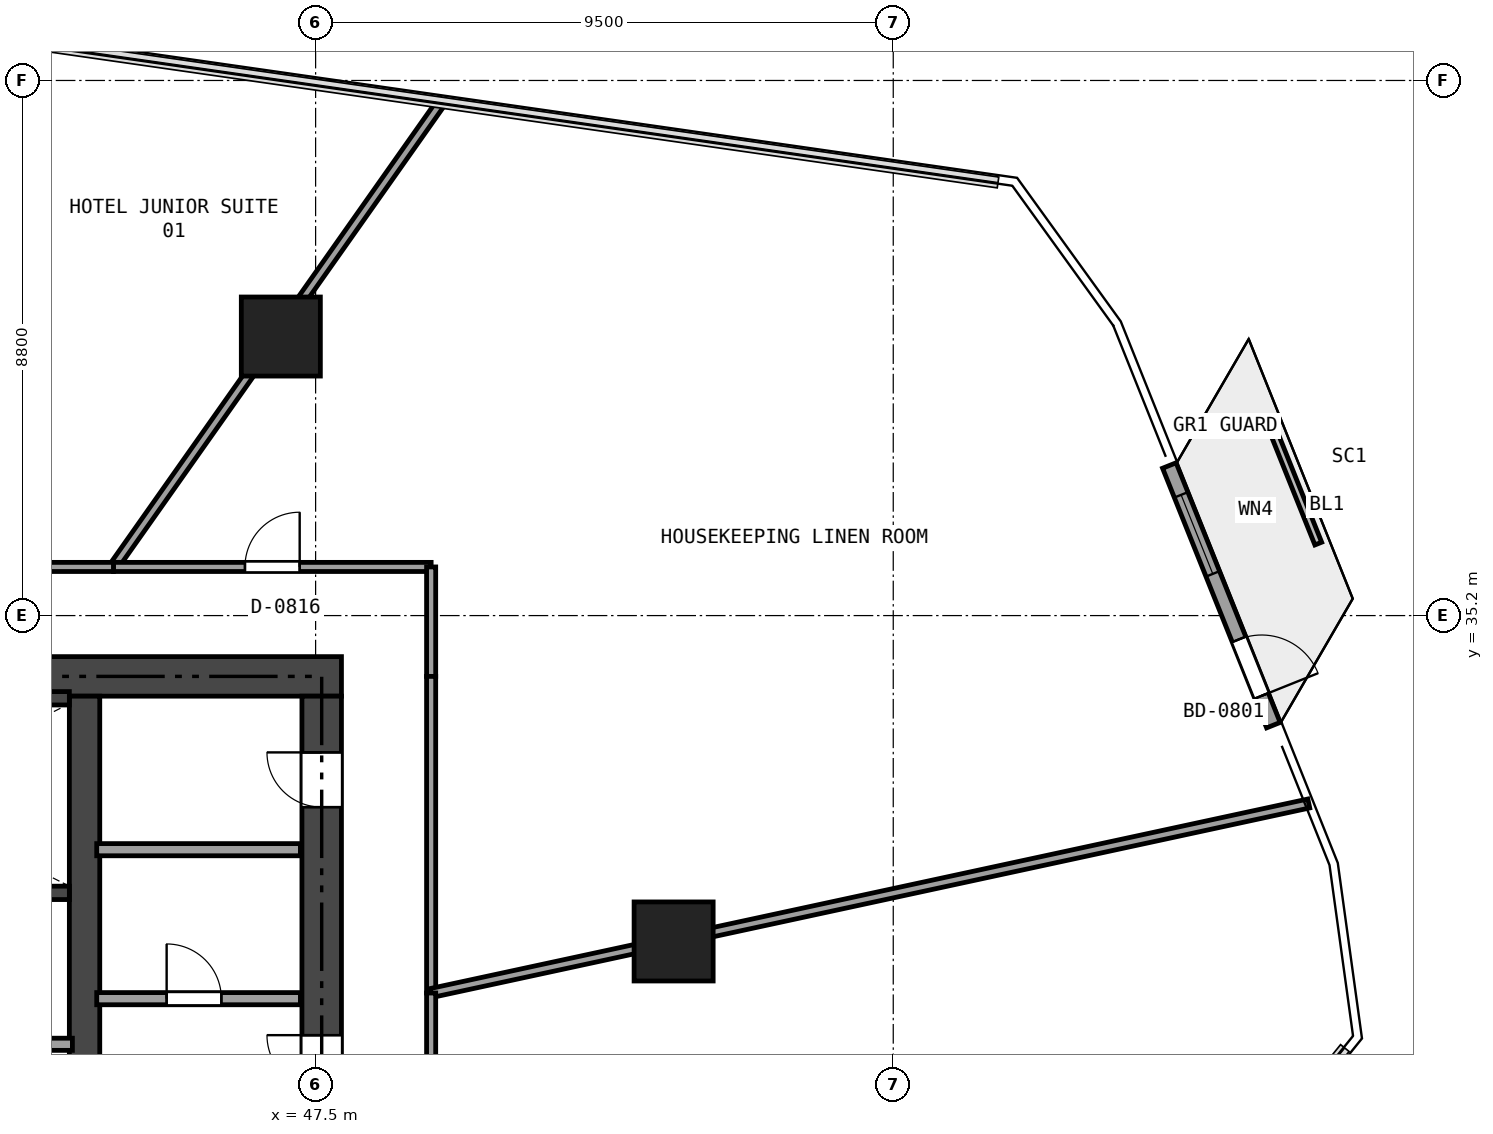
"""IFC4 building model, lengths in metres.
Left out: names, types, materials, properties, quantities, classifications, styles, units other than length and angle.
Written with IfcOpenShell. Run it as: python <this file> out.ifc"""

import sys

from ifc_helpers import new_model, si_unit, direction, frame, frame_2d, origin, origin_2d, place, context, subcontext, project, spatial, rectangle, extrude, element, fill, save


model = new_model("IFC4")
c1 = context("Model", 3, precision=1e-05, world=origin(), true_north=direction((0.0, 1.0)))
c2 = subcontext(c1, "Body", "Model", "MODEL_VIEW")
j1 = project(units=[si_unit("LENGTHUNIT", "METRE"), si_unit("PLANEANGLEUNIT", "RADIAN")], contexts=[c1])
p1 = place(None, origin())
s1 = spatial("IfcSite", under=j1, at=p1, CompositionType="ELEMENT")
p2 = place(p1, origin())
s2 = spatial("IfcBuilding", under=s1, at=p2, CompositionType="ELEMENT")
p3 = place(p2, frame((0.0, 0.0, 37.35)))
s3 = spatial("IfcBuildingStorey", under=s2, at=p3, CompositionType="ELEMENT", Elevation=37.35)
p4 = place(p3, frame((26.475, 34.2, 0.0), z_axis=(0.0, 0.0, 1.0), x_axis=(1.0, 0.0, 0.0)))
e1 = element("IfcWall", 1, at=p4, inside=s3, PredefinedType="SHEAR", context=c2, shape_type="SweptSolid", body=[
    extrude(rectangle(XDim=21.45, YDim=0.65, at=frame_2d((10.725, 0.0))), origin(), (0.0, 0.0, 1.0), 3.17),
])
p5 = place(p4, frame((9.725, 0.0, 0.0)))
e2 = element("IfcOpeningElement", 2, at=p5, cuts=e1, PredefinedType="OPENING", context=c2, shape_type="SweptSolid", body=[
    extrude(rectangle(XDim=1.1, YDim=2.15, at=frame_2d((0.55, 1.075))), frame((0.0, 0.335, 0.0), z_axis=(0.0, -1.0, 0.0), x_axis=(1.0, 0.0, 0.0)), (0.0, 0.0, 1.0), 0.67),
])
p6 = place(p4, frame((1.975, 0.0, 0.0)))
e3 = element("IfcOpeningElement", 3, at=p6, cuts=e1, PredefinedType="OPENING", context=c2, shape_type="SweptSolid", body=[
    extrude(rectangle(XDim=0.9, YDim=2.1, at=frame_2d((0.45, 1.05))), frame((0.0, 0.335, 0.0), z_axis=(0.0, -1.0, 0.0), x_axis=(1.0, 0.0, 0.0)), (0.0, 0.0, 1.0), 0.67),
])
p7 = place(p4, frame((6.275, 0.0, 0.0)))
e4 = element("IfcOpeningElement", 4, at=p7, cuts=e1, PredefinedType="OPENING", context=c2, shape_type="SweptSolid", body=[
    extrude(rectangle(XDim=0.9, YDim=2.1, at=frame_2d((0.45, 1.05))), frame((0.0, 0.335, 0.0), z_axis=(0.0, -1.0, 0.0), x_axis=(1.0, 0.0, 0.0)), (0.0, 0.0, 1.0), 0.67),
])
p8 = place(p3, frame((47.6, 18.925, 0.0), z_axis=(0.0, 0.0, 1.0), x_axis=(0.0, 1.0, 0.0)))
e5 = element("IfcWall", 5, at=p8, inside=s3, PredefinedType="SHEAR", context=c2, shape_type="SweptSolid", body=[
    extrude(rectangle(XDim=14.95, YDim=0.65, at=frame_2d((7.475, 0.0))), origin(), (0.0, 0.0, 1.0), 3.17),
])
p9 = place(p8, frame((6.575, 0.0, 0.0)))
e6 = element("IfcOpeningElement", 6, at=p9, cuts=e5, PredefinedType="OPENING", context=c2, shape_type="SweptSolid", body=[
    extrude(rectangle(XDim=1.1, YDim=2.15, at=frame_2d((0.55, 1.075))), frame((0.0, 0.335, 0.0), z_axis=(0.0, -1.0, 0.0), x_axis=(1.0, 0.0, 0.0)), (0.0, 0.0, 1.0), 0.67),
])
p10 = place(p8, frame((8.475, 0.0, 0.0)))
e7 = element("IfcOpeningElement", 7, at=p10, cuts=e5, PredefinedType="OPENING", context=c2, shape_type="SweptSolid", body=[
    extrude(rectangle(XDim=0.9, YDim=2.1, at=frame_2d((0.45, 1.05))), frame((0.0, 0.335, 0.0), z_axis=(0.0, -1.0, 0.0), x_axis=(1.0, 0.0, 0.0)), (0.0, 0.0, 1.0), 0.67),
])
p11 = place(p8, frame((13.125, 0.0, 0.0)))
e8 = element("IfcOpeningElement", 8, at=p11, cuts=e5, PredefinedType="OPENING", context=c2, shape_type="SweptSolid", body=[
    extrude(rectangle(XDim=0.9, YDim=2.1, at=frame_2d((0.45, 1.05))), frame((0.0, 0.335, 0.0), z_axis=(0.0, -1.0, 0.0), x_axis=(1.0, 0.0, 0.0)), (0.0, 0.0, 1.0), 0.67),
])
p12 = place(p3, frame((43.7, 18.925, 0.0), z_axis=(0.0, 0.0, 1.0), x_axis=(0.0, 1.0, 0.0)))
e9 = element("IfcWall", 9, at=p12, inside=s3, PredefinedType="SHEAR", context=c2, shape_type="SweptSolid", body=[
    extrude(rectangle(XDim=14.95, YDim=0.5, at=frame_2d((7.475, 0.0))), origin(), (0.0, 0.0, 1.0), 3.17),
])
p13 = place(p12, frame((8.075, 0.0, 0.0)))
e10 = element("IfcOpeningElement", 10, at=p13, cuts=e9, PredefinedType="OPENING", context=c2, shape_type="SweptSolid", body=[
    extrude(rectangle(XDim=0.9, YDim=2.1, at=frame_2d((0.45, 1.05))), frame((0.0, 0.26, 0.0), z_axis=(0.0, -1.0, 0.0), x_axis=(1.0, 0.0, 0.0)), (0.0, 0.0, 1.0), 0.52),
])
p14 = place(p3, frame((35.84, 30.64, 0.0), z_axis=(0.0, 0.0, 1.0), x_axis=(1.0, 0.0, 0.0)))
e11 = element("IfcWall", 11, at=p14, inside=s3, PredefinedType="SHEAR", context=c2, shape_type="SweptSolid", body=[
    extrude(rectangle(XDim=7.61, YDim=0.22, at=frame_2d((3.805, 0.0))), origin(), (0.0, 0.0, 1.0), 3.17),
])
p15 = place(p3, frame((37.55, 33.84, 0.0), z_axis=(0.0, 0.0, 1.0), x_axis=(1.0, 0.0, 0.0)))
e12 = element("IfcWall", 12, at=p15, inside=s3, PredefinedType="SHEAR", context=c2, shape_type="SweptSolid", body=[
    extrude(rectangle(XDim=5.9, YDim=0.22, at=frame_2d((2.95, 0.0))), origin(), (0.0, 0.0, 1.0), 3.17),
])
for number, where, z_axis, x_axis in (
    (13, (53.388, 29.841, 0.0), (0.0, 0.0, 1.0), (1.0, 0.0, 0.0)),
    (14, (46.928, 39.789, 0.0), (0.0, 0.0, 1.0), (1.0, 0.0, 0.0)),
):
    element("IfcColumn", number, at=place(p3, frame(where, z_axis=z_axis, x_axis=x_axis)), inside=s3, PredefinedType="COLUMN", context=c2, shape_type="SweptSolid", body=[
        extrude(rectangle(XDim=1.3, YDim=1.3, at=origin_2d()), origin(), (0.0, 0.0, 1.0), 3.17),
    ])
p16 = place(p3, frame((61.541, 37.668, 0.0), z_axis=(0.0, 0.0, 1.0), x_axis=(0.371939648456, -0.92825691374, 0.0)))
e15 = element("IfcWall", 15, at=p16, inside=s3, PredefinedType="SOLIDWALL", context=c2, shape_type="SweptSolid", body=[
    extrude(rectangle(XDim=4.6, YDim=0.24, at=frame_2d((2.3, 0.0))), origin(), (0.0, 0.0, 1.0), 3.17),
])
p17 = place(p16, frame((3.08, 0.0, 0.0)))
e16 = element("IfcOpeningElement", 16, at=p17, cuts=e15, PredefinedType="OPENING", context=c2, shape_type="SweptSolid", body=[
    extrude(rectangle(XDim=1.0, YDim=2.15, at=frame_2d((0.5, 1.075))), frame((0.0, 0.13, 0.0), z_axis=(0.0, -1.0, 0.0), x_axis=(1.0, 0.0, 0.0)), (0.0, 0.0, 1.0), 0.26),
])
p18 = place(p16, frame((0.52, 0.0, 0.2)))
e17 = element("IfcOpeningElement", 17, at=p18, cuts=e15, PredefinedType="OPENING", context=c2, shape_type="SweptSolid", body=[
    extrude(rectangle(XDim=1.4, YDim=1.95, at=frame_2d((0.7, 0.975))), frame((0.0, 0.13, 0.0), z_axis=(0.0, -1.0, 0.0), x_axis=(1.0, 0.0, 0.0)), (0.0, 0.0, 1.0), 0.26),
])
p19 = place(p3, frame((43.9, 28.9, 0.0), z_axis=(0.0, 0.0, 1.0), x_axis=(1.0, 0.0, 0.0)))
e18 = element("IfcWall", 18, at=p19, inside=s3, PredefinedType="SOLIDWALL", context=c2, shape_type="SweptSolid", body=[
    extrude(rectangle(XDim=3.35, YDim=0.2, at=frame_2d((1.675, 0.0))), origin(), (0.0, 0.0, 1.0), 3.17),
])
p20 = place(p19, frame((1.15, 0.0, 0.0)))
e19 = element("IfcOpeningElement", 19, at=p20, cuts=e18, PredefinedType="OPENING", context=c2, shape_type="SweptSolid", body=[
    extrude(rectangle(XDim=0.9, YDim=2.1, at=frame_2d((0.45, 1.05))), frame((0.0, 0.11, 0.0), z_axis=(0.0, -1.0, 0.0), x_axis=(1.0, 0.0, 0.0)), (0.0, 0.0, 1.0), 0.22),
])
p21 = place(p3, frame((43.9, 31.35, 0.0), z_axis=(0.0, 0.0, 1.0), x_axis=(1.0, 0.0, 0.0)))
e20 = element("IfcWall", 20, at=p21, inside=s3, PredefinedType="SOLIDWALL", context=c2, shape_type="SweptSolid", body=[
    extrude(rectangle(XDim=3.35, YDim=0.2, at=frame_2d((1.675, 0.0))), origin(), (0.0, 0.0, 1.0), 3.17),
])
p22 = place(p3, frame((35.62, 28.15, 0.0), z_axis=(0.0, 0.0, 1.0), x_axis=(1.0, 0.0, 0.0)))
e21 = element("IfcWall", 21, at=p22, inside=s3, PredefinedType="SOLIDWALL", context=c2, shape_type="SweptSolid", body=[
    extrude(rectangle(XDim=7.88, YDim=0.2, at=frame_2d((3.94, 0.0))), origin(), (0.0, 0.0, 1.0), 3.17),
])
p23 = place(p3, frame((49.594, 43.681, 0.0), z_axis=(0.0, 0.0, 1.0), x_axis=(-0.576479240775, -0.817111794649, 0.0)))
e22 = element("IfcWall", 22, at=p23, inside=s3, PredefinedType="PARTITIONING", context=c2, shape_type="SweptSolid", body=[
    extrude(rectangle(XDim=9.4, YDim=0.15, at=frame_2d((4.7, 0.0))), origin(), (0.0, 0.0, 1.0), 2.395),
])
p24 = place(p3, frame((44.175, 36.0, 0.0), z_axis=(0.0, 0.0, 1.0), x_axis=(1.0, 0.0, 0.0)))
e23 = element("IfcWall", 23, at=p24, inside=s3, PredefinedType="PARTITIONING", context=c2, shape_type="SweptSolid", body=[
    extrude(rectangle(XDim=5.225, YDim=0.15, at=frame_2d((2.612, 0.0))), origin(), (0.0, 0.0, 1.0), 2.355),
])
p25 = place(p24, frame((2.163, 0.0, 0.0)))
e24 = element("IfcOpeningElement", 24, at=p25, cuts=e23, PredefinedType="OPENING", context=c2, shape_type="SweptSolid", body=[
    extrude(rectangle(XDim=0.9, YDim=2.0, at=frame_2d((0.45, 1.0))), frame((0.0, 0.085, 0.0), z_axis=(0.0, -1.0, 0.0), x_axis=(1.0, 0.0, 0.0)), (0.0, 0.0, 1.0), 0.17),
])
p26 = place(p3, frame((49.4, 36.0, 0.0), z_axis=(0.0, 0.0, 1.0), x_axis=(0.0, -1.0, 0.0)))
e25 = element("IfcWall", 25, at=p26, inside=s3, PredefinedType="PARTITIONING", context=c2, shape_type="SweptSolid", body=[
    extrude(rectangle(XDim=1.8, YDim=0.15, at=frame_2d((0.9, 0.0))), origin(), (0.0, 0.0, 1.0), 2.355),
])
p27 = place(p3, frame((49.4, 34.2, 0.0), z_axis=(0.0, 0.0, 1.0), x_axis=(0.0, -1.0, 0.0)))
e26 = element("IfcWall", 26, at=p27, inside=s3, PredefinedType="PARTITIONING", context=c2, shape_type="SweptSolid", body=[
    extrude(rectangle(XDim=5.207, YDim=0.15, at=frame_2d((2.604, 0.0))), origin(), (0.0, 0.0, 1.0), 2.395),
])
p28 = place(p3, frame((49.4, 28.993, 0.0), z_axis=(0.0, 0.0, 1.0), x_axis=(0.977465823559, 0.211093732201, 0.0)))
e27 = element("IfcWall", 27, at=p28, inside=s3, PredefinedType="PARTITIONING", context=c2, shape_type="SweptSolid", body=[
    extrude(rectangle(XDim=14.767, YDim=0.15, at=frame_2d((7.383, 0.0))), origin(), (0.0, 0.0, 1.0), 2.395),
])
p29 = place(p3, frame((36.865, 36.0, 0.0), z_axis=(0.0, 0.0, 1.0), x_axis=(1.0, 0.0, 0.0)))
e28 = element("IfcWall", 28, at=p29, inside=s3, PredefinedType="PARTITIONING", context=c2, shape_type="SweptSolid", body=[
    extrude(rectangle(XDim=7.31, YDim=0.15, at=frame_2d((3.655, 0.0))), origin(), (0.0, 0.0, 1.0), 2.395),
])
p30 = place(p29, frame((3.18, 0.0, 0.0)))
e29 = element("IfcOpeningElement", 29, at=p30, cuts=e28, PredefinedType="OPENING", context=c2, shape_type="SweptSolid", body=[
    extrude(rectangle(XDim=0.95, YDim=2.15, at=frame_2d((0.475, 1.075))), frame((0.0, 0.085, 0.0), z_axis=(0.0, -1.0, 0.0), x_axis=(1.0, 0.0, 0.0)), (0.0, 0.0, 1.0), 0.17),
])
p31 = place(p3, frame((49.4, 28.993, 0.0), z_axis=(0.0, 0.0, 1.0), x_axis=(0.0, -1.0, 0.0)))
e30 = element("IfcWall", 30, at=p31, inside=s3, PredefinedType="PARTITIONING", context=c2, shape_type="SweptSolid", body=[
    extrude(rectangle(XDim=7.033, YDim=0.15, at=frame_2d((3.517, 0.0))), origin(), (0.0, 0.0, 1.0), 2.395),
])
p32 = place(p31, frame((3.041, 0.0, 0.0)))
e31 = element("IfcOpeningElement", 31, at=p32, cuts=e30, PredefinedType="OPENING", context=c2, shape_type="SweptSolid", body=[
    extrude(rectangle(XDim=0.95, YDim=2.15, at=frame_2d((0.475, 1.075))), frame((0.0, 0.085, 0.0), z_axis=(0.0, -1.0, 0.0), x_axis=(1.0, 0.0, 0.0)), (0.0, 0.0, 1.0), 0.17),
])
p33 = place(p17, origin())
e32 = element("IfcDoor", 32, at=p33, inside=s3, OperationType="SINGLE_SWING_RIGHT", PredefinedType="DOOR", context=c2, shape_type="SweptSolid", body=[
    extrude(rectangle(XDim=1.0, YDim=2.15, at=frame_2d((0.5, 1.075))), frame((0.0, 0.025, 0.0), z_axis=(0.0, -1.0, 0.0), x_axis=(1.0, 0.0, 0.0)), (0.0, 0.0, 1.0), 0.05),
])
fill(e16, e32)
p34 = place(p18, origin())
e33 = element("IfcWindow", 33, at=p34, inside=s3, PartitioningType="SINGLE_PANEL", PredefinedType="WINDOW", context=c2, shape_type="SweptSolid", body=[
    extrude(rectangle(XDim=1.4, YDim=1.95, at=frame_2d((0.7, 0.975))), frame((0.0, 0.03, 0.0), z_axis=(0.0, -1.0, 0.0), x_axis=(1.0, 0.0, 0.0)), (0.0, 0.0, 1.0), 0.06),
])
fill(e17, e33)
p35 = place(p10, origin())
e34 = element("IfcDoor", 34, at=p35, inside=s3, OperationType="SINGLE_SWING_RIGHT", PredefinedType="DOOR", context=c2, shape_type="SweptSolid", body=[
    extrude(rectangle(XDim=0.9, YDim=2.1, at=frame_2d((0.45, 1.05))), frame((0.0, 0.025, 0.0), z_axis=(0.0, -1.0, 0.0), x_axis=(1.0, 0.0, 0.0)), (0.0, 0.0, 1.0), 0.05),
])
fill(e7, e34)
p36 = place(p20, origin())
e35 = element("IfcDoor", 35, at=p36, inside=s3, OperationType="SINGLE_SWING_LEFT", PredefinedType="DOOR", context=c2, shape_type="SweptSolid", body=[
    extrude(rectangle(XDim=0.9, YDim=2.1, at=frame_2d((0.45, 1.05))), frame((0.0, 0.025, 0.0), z_axis=(0.0, -1.0, 0.0), x_axis=(1.0, 0.0, 0.0)), (0.0, 0.0, 1.0), 0.05),
])
fill(e19, e35)
p37 = place(p11, origin())
e36 = element("IfcDoor", 36, at=p37, inside=s3, OperationType="SINGLE_SWING_RIGHT", PredefinedType="DOOR", context=c2, shape_type="SweptSolid", body=[
    extrude(rectangle(XDim=0.9, YDim=2.1, at=frame_2d((0.45, 1.05))), frame((0.0, 0.025, 0.0), z_axis=(0.0, -1.0, 0.0), x_axis=(1.0, 0.0, 0.0)), (0.0, 0.0, 1.0), 0.05),
])
fill(e8, e36)
p38 = place(p25, origin())
e37 = element("IfcDoor", 37, at=p38, inside=s3, OperationType="SINGLE_SWING_RIGHT", PredefinedType="DOOR", context=c2, shape_type="SweptSolid", body=[
    extrude(rectangle(XDim=0.9, YDim=2.0, at=frame_2d((0.45, 1.0))), frame((0.0, 0.025, 0.0), z_axis=(0.0, -1.0, 0.0), x_axis=(1.0, 0.0, 0.0)), (0.0, 0.0, 1.0), 0.05),
])
fill(e24, e37)
save(model, sys.argv[1])
